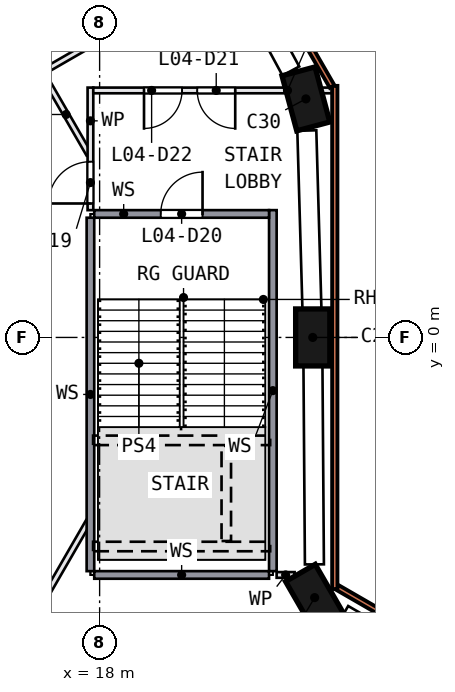
"""IFC4 building model, lengths in metres.
Left out: names, types, materials, properties, quantities, classifications, styles, units other than length and angle.
Written with IfcOpenShell. Run it as: python <this file> out.ifc"""

import sys

from ifc_helpers import new_model, si_unit, direction, frame, frame_2d, origin, origin_2d, place, context, subcontext, project, spatial, rectangle, extrude, element, fill, save


model = new_model("IFC4")
c1 = context("Model", 3, precision=1e-05, world=origin(), true_north=direction((0.0, 1.0)))
c2 = subcontext(c1, "Body", "Model", "MODEL_VIEW")
j1 = project(units=[si_unit("LENGTHUNIT", "METRE"), si_unit("PLANEANGLEUNIT", "RADIAN")], contexts=[c1])
p1 = place(None, origin())
s1 = spatial("IfcSite", under=j1, at=p1, CompositionType="ELEMENT")
p2 = place(p1, origin())
s2 = spatial("IfcBuilding", under=s1, at=p2, CompositionType="ELEMENT")
p3 = place(p2, frame((0.0, 0.0, 23.5)))
s3 = spatial("IfcBuildingStorey", under=s2, at=p3, CompositionType="ELEMENT", Elevation=23.5)
for number, where, z_axis, x_axis in (
    (1, (23.658, -6.846, 0.0), (0.0, 0.0, 1.0), (0.5, -0.866, 0.0)),
    (2, (23.608, 0.0, 0.0), (0.0, 0.0, 1.0), (0.0, 1.0, 0.0)),
    (3, (23.428, 6.278, 0.0), (0.0, 0.0, 1.0), (0.259, -0.966, 0.0)),
):
    element("IfcColumn", number, at=place(p3, frame(where, z_axis=z_axis, x_axis=x_axis)), inside=s3, PredefinedType="COLUMN", context=c2, shape_type="SweptSolid", body=[
        extrude(rectangle(XDim=1.5, YDim=0.9, at=origin_2d()), origin(), (0.0, 0.0, 1.0), 4.0),
    ])
p4 = place(p3, frame((33.751, -12.062, 0.0), z_axis=(0.0, 0.0, 1.0), x_axis=(-0.86602647, 0.499998154, 0.0)))
e4 = element("IfcWall", 4, at=p4, inside=s3, PredefinedType="SOLIDWALL", context=c2, shape_type="SweptSolid", body=[
    extrude(rectangle(XDim=10.961, YDim=0.14, at=frame_2d((5.481, 0.0))), origin(), (0.0, 0.0, 1.0), 4.0),
])
p5 = place(p4, frame((6.702, 0.0, 0.9)))
e5 = element("IfcOpeningElement", 5, at=p5, cuts=e4, PredefinedType="OPENING", context=c2, shape_type="SweptSolid", body=[
    extrude(rectangle(XDim=3.0, YDim=2.4, at=frame_2d((1.5, 1.2))), frame((0.0, 0.08, 0.0), z_axis=(0.0, -1.0, 0.0), x_axis=(1.0, 0.0, 0.0)), (0.0, 0.0, 1.0), 0.16),
])
p6 = place(p3, frame((24.188, -6.621, 0.0), z_axis=(0.0, 0.0, 1.0), x_axis=(0.0, 1.0, 0.0)))
e6 = element("IfcWall", 6, at=p6, inside=s3, PredefinedType="SOLIDWALL", context=c2, shape_type="SweptSolid", body=[
    extrude(rectangle(XDim=13.242, YDim=0.14, at=frame_2d((6.621, 0.0))), origin(), (0.0, 0.0, 1.0), 4.0),
])
p7 = place(p3, frame((24.118, 6.603, 0.0), z_axis=(0.0, 0.0, 1.0), x_axis=(-0.499997984, 0.866026568, 0.0)))
e7 = element("IfcWall", 7, at=p7, inside=s3, PredefinedType="SOLIDWALL", context=c2, shape_type="SweptSolid", body=[
    extrude(rectangle(XDim=12.962, YDim=0.14, at=frame_2d((6.481, 0.0))), origin(), (0.0, 0.0, 1.0), 4.0),
])
p8 = place(p3, frame((16.517, 6.909, 0.0), z_axis=(0.0, 0.0, 1.0), x_axis=(0.499933044, -0.866064057, 0.0)))
e8 = element("IfcWall", 8, at=p8, inside=s3, PredefinedType="PARTITIONING", context=c2, shape_type="SweptSolid", body=[
    extrude(rectangle(XDim=2.408, YDim=0.15, at=frame_2d((1.204, 0.0))), origin(), (0.0, 0.0, 1.0), 4.0),
])
p9 = place(p3, frame((17.858, -6.25, 0.0), z_axis=(0.0, 0.0, 1.0), x_axis=(1.0, 0.0, 0.0)))
e9 = element("IfcWall", 9, at=p9, inside=s3, PredefinedType="SOLIDWALL", context=c2, shape_type="SweptSolid", body=[
    extrude(rectangle(XDim=4.6, YDim=0.2, at=frame_2d((2.3, 0.0))), origin(), (0.0, 0.0, 1.0), 4.0),
])
p10 = place(p3, frame((12.117, -14.53, 0.0), z_axis=(0.0, 0.0, 1.0), x_axis=(0.500001509, 0.866024532, 0.0)))
e10 = element("IfcWall", 10, at=p10, inside=s3, PredefinedType="PARTITIONING", context=c2, shape_type="SweptSolid", body=[
    extrude(rectangle(XDim=11.183, YDim=0.15, at=frame_2d((5.592, 0.0))), origin(), (0.0, 0.0, 1.0), 4.0),
])
p11 = place(p10, frame((5.433, 0.0, 0.0)))
e11 = element("IfcOpeningElement", 11, at=p11, cuts=e10, PredefinedType="OPENING", context=c2, shape_type="SweptSolid", body=[
    extrude(rectangle(XDim=1.8, YDim=2.1, at=frame_2d((0.9, 1.05))), frame((0.0, 0.085, 0.0), z_axis=(0.0, -1.0, 0.0), x_axis=(1.0, 0.0, 0.0)), (0.0, 0.0, 1.0), 0.17),
])
p12 = place(p3, frame((17.758, 3.15, 0.0), z_axis=(0.0, 0.0, 1.0), x_axis=(0.0, -1.0, 0.0)))
e12 = element("IfcWall", 12, at=p12, inside=s3, PredefinedType="SOLIDWALL", context=c2, shape_type="SweptSolid", body=[
    extrude(rectangle(XDim=9.3, YDim=0.2, at=frame_2d((4.65, 0.0))), origin(), (0.0, 0.0, 1.0), 4.0),
])
p13 = place(p3, frame((17.758, 3.35, 0.0), z_axis=(0.0, 0.0, 1.0), x_axis=(0.0, 1.0, 0.0)))
e13 = element("IfcWall", 13, at=p13, inside=s3, PredefinedType="PARTITIONING", context=c2, shape_type="SweptSolid", body=[
    extrude(rectangle(XDim=3.225, YDim=0.15, at=frame_2d((1.613, 0.0))), origin(), (0.0, 0.0, 1.0), 4.0),
])
p14 = place(p13, frame((0.175, 0.0, 0.0)))
e14 = element("IfcOpeningElement", 14, at=p14, cuts=e13, PredefinedType="OPENING", context=c2, shape_type="SweptSolid", body=[
    extrude(rectangle(XDim=1.1, YDim=2.1, at=frame_2d((0.55, 1.05))), frame((0.0, 0.085, 0.0), z_axis=(0.0, -1.0, 0.0), x_axis=(1.0, 0.0, 0.0)), (0.0, 0.0, 1.0), 0.17),
])
p15 = place(p3, frame((21.987, 10.154, 0.0), z_axis=(0.0, 0.0, 1.0), x_axis=(-0.866032921, -0.49998698, 0.0)))
e15 = element("IfcWall", 15, at=p15, inside=s3, PredefinedType="PARTITIONING", context=c2, shape_type="SweptSolid", body=[
    extrude(rectangle(XDim=6.285, YDim=0.15, at=frame_2d((3.143, 0.0))), origin(), (0.0, 0.0, 1.0), 4.0),
])
p16 = place(p3, frame((22.558, -6.15, 0.0), z_axis=(0.0, 0.0, 1.0), x_axis=(0.0, 1.0, 0.0)))
e16 = element("IfcWall", 16, at=p16, inside=s3, PredefinedType="SOLIDWALL", context=c2, shape_type="SweptSolid", body=[
    extrude(rectangle(XDim=9.5, YDim=0.2, at=frame_2d((4.75, 0.0))), origin(), (0.0, 0.0, 1.0), 4.0),
])
p17 = place(p3, frame((22.658, -6.25, 0.0), z_axis=(0.0, 0.0, 1.0), x_axis=(1.0, 0.0, 0.0)))
e17 = element("IfcWall", 17, at=p17, inside=s3, PredefinedType="PARTITIONING", context=c2, shape_type="SweptSolid", body=[
    extrude(rectangle(XDim=0.473, YDim=0.15, at=frame_2d((0.237, 0.0))), origin(), (0.0, 0.0, 1.0), 4.0),
])
p18 = place(p3, frame((17.858, 3.25, 0.0), z_axis=(0.0, 0.0, 1.0), x_axis=(1.0, 0.0, 0.0)))
e18 = element("IfcWall", 18, at=p18, inside=s3, PredefinedType="SOLIDWALL", context=c2, shape_type="SweptSolid", body=[
    extrude(rectangle(XDim=4.6, YDim=0.2, at=frame_2d((2.3, 0.0))), origin(), (0.0, 0.0, 1.0), 4.0),
])
p19 = place(p18, frame((1.75, 0.0, 0.0)))
e19 = element("IfcOpeningElement", 19, at=p19, cuts=e18, PredefinedType="OPENING", context=c2, shape_type="SweptSolid", body=[
    extrude(rectangle(XDim=1.1, YDim=2.1, at=frame_2d((0.55, 1.05))), frame((0.0, 0.11, 0.0), z_axis=(0.0, -1.0, 0.0), x_axis=(1.0, 0.0, 0.0)), (0.0, 0.0, 1.0), 0.22),
])
p20 = place(p3, frame((24.118, 6.5, 0.0), z_axis=(0.0, 0.0, 1.0), x_axis=(-1.0, 0.0, 0.0)))
e20 = element("IfcWall", 20, at=p20, inside=s3, PredefinedType="PARTITIONING", context=c2, shape_type="SweptSolid", body=[
    extrude(rectangle(XDim=6.285, YDim=0.15, at=frame_2d((3.143, 0.0))), origin(), (0.0, 0.0, 1.0), 4.0),
])
p21 = place(p20, frame((2.55, 0.0, 0.0)))
e21 = element("IfcOpeningElement", 21, at=p21, cuts=e20, PredefinedType="OPENING", context=c2, shape_type="SweptSolid", body=[
    extrude(rectangle(XDim=1.0, YDim=2.1, at=frame_2d((0.5, 1.05))), frame((0.0, 0.085, 0.0), z_axis=(0.0, -1.0, 0.0), x_axis=(1.0, 0.0, 0.0)), (0.0, 0.0, 1.0), 0.17),
])
p22 = place(p20, frame((3.95, 0.0, 0.0)))
e22 = element("IfcOpeningElement", 22, at=p22, cuts=e20, PredefinedType="OPENING", context=c2, shape_type="SweptSolid", body=[
    extrude(rectangle(XDim=1.0, YDim=2.1, at=frame_2d((0.5, 1.05))), frame((0.0, 0.085, 0.0), z_axis=(0.0, -1.0, 0.0), x_axis=(1.0, 0.0, 0.0)), (0.0, 0.0, 1.0), 0.17),
])
p23 = place(p14, origin())
e23 = element("IfcDoor", 23, at=p23, inside=s3, OperationType="SINGLE_SWING_LEFT", PredefinedType="DOOR", context=c2, shape_type="SweptSolid", body=[
    extrude(rectangle(XDim=1.1, YDim=2.1, at=frame_2d((0.55, 1.05))), frame((0.0, 0.025, 0.0), z_axis=(0.0, -1.0, 0.0), x_axis=(1.0, 0.0, 0.0)), (0.0, 0.0, 1.0), 0.05),
])
fill(e14, e23)
p24 = place(p19, origin())
e24 = element("IfcDoor", 24, at=p24, inside=s3, OperationType="SINGLE_SWING_RIGHT", PredefinedType="DOOR", context=c2, shape_type="SweptSolid", body=[
    extrude(rectangle(XDim=1.1, YDim=2.1, at=frame_2d((0.55, 1.05))), frame((0.0, 0.025, 0.0), z_axis=(0.0, -1.0, 0.0), x_axis=(1.0, 0.0, 0.0)), (0.0, 0.0, 1.0), 0.05),
])
fill(e19, e24)
p25 = place(p21, origin())
e25 = element("IfcDoor", 25, at=p25, inside=s3, OperationType="SINGLE_SWING_LEFT", PredefinedType="DOOR", context=c2, shape_type="SweptSolid", body=[
    extrude(rectangle(XDim=1.0, YDim=2.1, at=frame_2d((0.5, 1.05))), frame((0.0, 0.025, 0.0), z_axis=(0.0, -1.0, 0.0), x_axis=(1.0, 0.0, 0.0)), (0.0, 0.0, 1.0), 0.05),
])
fill(e21, e25)
p26 = place(p22, origin())
e26 = element("IfcDoor", 26, at=p26, inside=s3, OperationType="SINGLE_SWING_RIGHT", PredefinedType="DOOR", context=c2, shape_type="SweptSolid", body=[
    extrude(rectangle(XDim=1.0, YDim=2.1, at=frame_2d((0.5, 1.05))), frame((0.0, 0.025, 0.0), z_axis=(0.0, -1.0, 0.0), x_axis=(1.0, 0.0, 0.0)), (0.0, 0.0, 1.0), 0.05),
])
fill(e22, e26)
save(model, sys.argv[1])
